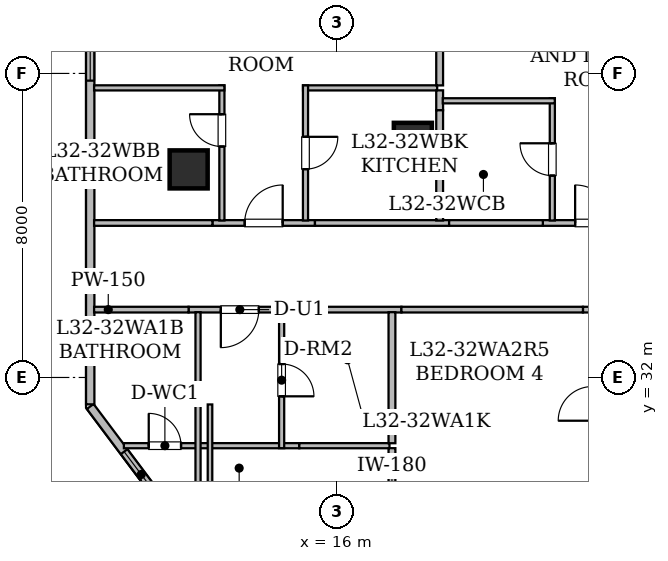
"""IFC4 building model, lengths in metres.
Left out: names, types, materials, properties, quantities, classifications, styles, units other than length and angle.
Written with IfcOpenShell. Run it as: python <this file> out.ifc"""

import sys

from ifc_helpers import new_model, si_unit, direction, frame, frame_2d, origin, origin_2d, place, context, subcontext, project, spatial, rectangle, hollow_rectangle, extrude, element, fill, save


model = new_model("IFC4")
c1 = context("Model", 3, precision=1e-05, world=origin(), true_north=direction((0.0, 1.0)))
c2 = subcontext(c1, "Body", "Model", "MODEL_VIEW")
j1 = project(units=[si_unit("LENGTHUNIT", "METRE"), si_unit("PLANEANGLEUNIT", "RADIAN")], contexts=[c1])
p1 = place(None, origin())
s1 = spatial("IfcSite", under=j1, at=p1, CompositionType="ELEMENT")
p2 = place(p1, origin())
s2 = spatial("IfcBuilding", under=s1, at=p2, CompositionType="ELEMENT")
p3 = place(p2, frame((0.0, 0.0, 127.45)))
s3 = spatial("IfcBuildingStorey", under=s2, at=p3, CompositionType="ELEMENT", Elevation=127.45)
for number, where, z_axis, x_axis in (
    (1, (12.1, 37.475, 0.0), (0.0, 0.0, 1.0), (1.0, 0.0, 0.0)),
    (2, (18.0, 38.2, 0.0), (0.0, 0.0, 1.0), (1.0, 0.0, 0.0)),
):
    element("IfcColumn", number, at=place(p3, frame(where, z_axis=z_axis, x_axis=x_axis)), inside=s3, PredefinedType="COLUMN", context=c2, shape_type="SweptSolid", body=[
        extrude(hollow_rectangle(XDim=1.0, YDim=1.0, WallThickness=0.05, at=origin_2d()), origin(), (0.0, 0.0, 1.0), 3.65),
    ])
p4 = place(p3, frame((11.881, 28.077, 0.0), z_axis=(0.0, 0.0, 1.0), x_axis=(-0.600158184825, 0.799881336942, 0.0)))
e3 = element("IfcWall", 3, at=p4, inside=s3, PredefinedType="STANDARD", context=c2, shape_type="SweptSolid", body=[
    extrude(rectangle(XDim=3.951, YDim=0.22, at=frame_2d((1.975, 0.0))), origin(), (0.0, 0.0, 1.0), 3.43),
])
p5 = place(p4, frame((0.964, 0.0, 0.85)))
e4 = element("IfcOpeningElement", 4, at=p5, cuts=e3, PredefinedType="OPENING", context=c2, shape_type="SweptSolid", body=[
    extrude(rectangle(XDim=1.5, YDim=1.6, at=frame_2d((0.75, 0.8))), frame((0.0, 0.12, 0.0), z_axis=(0.0, -1.0, 0.0), x_axis=(1.0, 0.0, 0.0)), (0.0, 0.0, 1.0), 0.24),
])
p6 = place(p3, frame((9.51, 31.293, 0.0), z_axis=(0.0, 0.0, 1.0), x_axis=(0.0, 1.0, 0.0)))
e5 = element("IfcWall", 5, at=p6, inside=s3, PredefinedType="STANDARD", context=c2, shape_type="SweptSolid", body=[
    extrude(rectangle(XDim=14.061, YDim=0.22, at=frame_2d((7.031, 0.0))), origin(), (0.0, 0.0, 1.0), 3.43),
])
p7 = place(p6, frame((8.517, 0.0, 0.8)))
e6 = element("IfcOpeningElement", 6, at=p7, cuts=e5, PredefinedType="OPENING", context=c2, shape_type="SweptSolid", body=[
    extrude(rectangle(XDim=1.2, YDim=1.5, at=frame_2d((0.6, 0.75))), frame((0.0, 0.12, 0.0), z_axis=(0.0, -1.0, 0.0), x_axis=(1.0, 0.0, 0.0)), (0.0, 0.0, 1.0), 0.24),
])
p8 = place(p6, frame((10.766, 0.0, 0.85)))
e7 = element("IfcOpeningElement", 7, at=p8, cuts=e5, PredefinedType="OPENING", context=c2, shape_type="SweptSolid", body=[
    extrude(rectangle(XDim=1.65, YDim=1.55, at=frame_2d((0.825, 0.775))), frame((0.0, 0.12, 0.0), z_axis=(0.0, -1.0, 0.0), x_axis=(1.0, 0.0, 0.0)), (0.0, 0.0, 1.0), 0.24),
])
p9 = place(p3, frame((14.796, 33.785, 0.0), z_axis=(0.0, 0.0, 1.0), x_axis=(-1.0, 0.0, 0.0)))
e8 = element("IfcWall", 8, at=p9, inside=s3, PredefinedType="STANDARD", context=c2, shape_type="SweptSolid", body=[
    extrude(rectangle(XDim=2.698, YDim=0.15, at=frame_2d((1.349, 0.0))), origin(), (0.0, 0.0, 1.0), 2.876),
])
p10 = place(p9, frame((0.849, 0.0, 0.0)))
e9 = element("IfcOpeningElement", 9, at=p10, cuts=e8, PredefinedType="OPENING", context=c2, shape_type="SweptSolid", body=[
    extrude(rectangle(XDim=1.0, YDim=2.15, at=frame_2d((0.5, 1.075))), frame((0.0, 0.085, 0.0), z_axis=(0.0, -1.0, 0.0), x_axis=(1.0, 0.0, 0.0)), (0.0, 0.0, 1.0), 0.17),
])
p11 = place(p3, frame((12.098, 33.785, 0.0), z_axis=(0.0, 0.0, 1.0), x_axis=(-1.0, 0.0, 0.0)))
e10 = element("IfcWall", 10, at=p11, inside=s3, PredefinedType="STANDARD", context=c2, shape_type="SweptSolid", body=[
    extrude(rectangle(XDim=2.486, YDim=0.15, at=frame_2d((1.243, 0.0))), origin(), (0.0, 0.0, 1.0), 2.876),
])
p12 = place(p3, frame((17.699, 33.785, 0.0), z_axis=(0.0, 0.0, 1.0), x_axis=(-1.0, 0.0, 0.0)))
e11 = element("IfcWall", 11, at=p12, inside=s3, PredefinedType="STANDARD", context=c2, shape_type="SweptSolid", body=[
    extrude(rectangle(XDim=2.903, YDim=0.15, at=frame_2d((1.452, 0.0))), origin(), (0.0, 0.0, 1.0), 3.43),
])
p13 = place(p3, frame((24.056, 33.785, 0.0), z_axis=(0.0, 0.0, 1.0), x_axis=(-1.0, 0.0, 0.0)))
e12 = element("IfcWall", 12, at=p13, inside=s3, PredefinedType="STANDARD", context=c2, shape_type="SweptSolid", body=[
    extrude(rectangle(XDim=1.58, YDim=0.15, at=frame_2d((0.79, 0.0))), origin(), (0.0, 0.0, 1.0), 3.43),
])
p14 = place(p3, frame((22.476, 33.785, 0.0), z_axis=(0.0, 0.0, 1.0), x_axis=(-1.0, 0.0, 0.0)))
e13 = element("IfcWall", 13, at=p14, inside=s3, PredefinedType="STANDARD", context=c2, shape_type="SweptSolid", body=[
    extrude(rectangle(XDim=4.777, YDim=0.15, at=frame_2d((2.389, 0.0))), origin(), (0.0, 0.0, 1.0), 2.647),
])
p15 = place(p3, frame((12.726, 36.065, 0.0), z_axis=(0.0, 0.0, 1.0), x_axis=(1.0, 0.0, 0.0)))
e14 = element("IfcWall", 14, at=p15, inside=s3, PredefinedType="STANDARD", context=c2, shape_type="SweptSolid", body=[
    extrude(rectangle(XDim=2.698, YDim=0.15, at=frame_2d((1.349, 0.0))), origin(), (0.0, 0.0, 1.0), 3.43),
])
p16 = place(p15, frame((0.849, 0.0, 0.0)))
e15 = element("IfcOpeningElement", 15, at=p16, cuts=e14, PredefinedType="OPENING", context=c2, shape_type="SweptSolid", body=[
    extrude(rectangle(XDim=1.0, YDim=2.15, at=frame_2d((0.5, 1.075))), frame((0.0, 0.085, 0.0), z_axis=(0.0, -1.0, 0.0), x_axis=(1.0, 0.0, 0.0)), (0.0, 0.0, 1.0), 0.17),
])
p17 = place(p3, frame((9.612, 36.065, 0.0), z_axis=(0.0, 0.0, 1.0), x_axis=(1.0, 0.0, 0.0)))
e16 = element("IfcWall", 16, at=p17, inside=s3, PredefinedType="STANDARD", context=c2, shape_type="SweptSolid", body=[
    extrude(rectangle(XDim=3.114, YDim=0.15, at=frame_2d((1.557, 0.0))), origin(), (0.0, 0.0, 1.0), 2.876),
])
p18 = place(p3, frame((15.424, 36.065, 0.0), z_axis=(0.0, 0.0, 1.0), x_axis=(1.0, 0.0, 0.0)))
e17 = element("IfcWall", 17, at=p18, inside=s3, PredefinedType="STANDARD", context=c2, shape_type="SweptSolid", body=[
    extrude(rectangle(XDim=3.53, YDim=0.15, at=frame_2d((1.765, 0.0))), origin(), (0.0, 0.0, 1.0), 2.647),
])
p19 = place(p3, frame((21.421, 36.065, 0.0), z_axis=(0.0, 0.0, 1.0), x_axis=(1.0, 0.0, 0.0)))
e18 = element("IfcWall", 18, at=p19, inside=s3, PredefinedType="STANDARD", context=c2, shape_type="SweptSolid", body=[
    extrude(rectangle(XDim=2.698, YDim=0.15, at=frame_2d((1.349, 0.0))), origin(), (0.0, 0.0, 1.0), 3.43),
])
p20 = place(p19, frame((0.849, 0.0, 0.0)))
e19 = element("IfcOpeningElement", 19, at=p20, cuts=e18, PredefinedType="OPENING", context=c2, shape_type="SweptSolid", body=[
    extrude(rectangle(XDim=1.0, YDim=2.15, at=frame_2d((0.5, 1.075))), frame((0.0, 0.085, 0.0), z_axis=(0.0, -1.0, 0.0), x_axis=(1.0, 0.0, 0.0)), (0.0, 0.0, 1.0), 0.17),
])
p21 = place(p3, frame((18.954, 36.065, 0.0), z_axis=(0.0, 0.0, 1.0), x_axis=(1.0, 0.0, 0.0)))
e20 = element("IfcWall", 20, at=p21, inside=s3, PredefinedType="STANDARD", context=c2, shape_type="SweptSolid", body=[
    extrude(rectangle(XDim=2.467, YDim=0.15, at=frame_2d((1.233, 0.0))), origin(), (0.0, 0.0, 1.0), 3.43),
])
p22 = place(p3, frame((10.396, 30.205, 0.0), z_axis=(0.0, 0.0, 1.0), x_axis=(1.0, 0.0, 0.0)))
e21 = element("IfcWall", 21, at=p22, inside=s3, PredefinedType="PARTITIONING", context=c2, shape_type="SweptSolid", body=[
    extrude(rectangle(XDim=4.616, YDim=0.135, at=frame_2d((2.308, 0.0))), origin(), (0.0, 0.0, 1.0), 2.876),
])
p23 = place(p22, frame((0.654, 0.0, 0.0)))
e22 = element("IfcOpeningElement", 22, at=p23, cuts=e21, PredefinedType="OPENING", context=c2, shape_type="SweptSolid", body=[
    extrude(rectangle(XDim=0.85, YDim=2.1, at=frame_2d((0.425, 1.05))), frame((0.0, 0.077, 0.0), z_axis=(0.0, -1.0, 0.0), x_axis=(1.0, 0.0, 0.0)), (0.0, 0.0, 1.0), 0.155),
])
p24 = place(p3, frame((12.347, 27.54, 0.0), z_axis=(0.0, 0.0, 1.0), x_axis=(0.0, 1.0, 0.0)))
e23 = element("IfcWall", 23, at=p24, inside=s3, PredefinedType="PARTITIONING", context=c2, shape_type="SweptSolid", body=[
    extrude(rectangle(XDim=6.178, YDim=0.135, at=frame_2d((3.089, 0.0))), origin(), (0.0, 0.0, 1.0), 2.876),
])
p25 = place(p3, frame((14.547, 33.718, 0.0), z_axis=(0.0, 0.0, 1.0), x_axis=(0.0, -1.0, 0.0)))
e24 = element("IfcWall", 24, at=p25, inside=s3, PredefinedType="PARTITIONING", context=c2, shape_type="SweptSolid", body=[
    extrude(rectangle(XDim=3.578, YDim=0.135, at=frame_2d((1.789, 0.0))), origin(), (0.0, 0.0, 1.0), 3.43),
])
p26 = place(p25, frame((1.364, 0.0, 0.0)))
e25 = element("IfcOpeningElement", 25, at=p26, cuts=e24, PredefinedType="OPENING", context=c2, shape_type="SweptSolid", body=[
    extrude(rectangle(XDim=0.85, YDim=2.1, at=frame_2d((0.425, 1.05))), frame((0.0, 0.077, 0.0), z_axis=(0.0, -1.0, 0.0), x_axis=(1.0, 0.0, 0.0)), (0.0, 0.0, 1.0), 0.155),
])
p27 = place(p3, frame((15.012, 30.205, 0.0), z_axis=(0.0, 0.0, 1.0), x_axis=(1.0, 0.0, 0.0)))
e26 = element("IfcWall", 26, at=p27, inside=s3, PredefinedType="PARTITIONING", context=c2, shape_type="SweptSolid", body=[
    extrude(rectangle(XDim=2.373, YDim=0.135, at=frame_2d((1.187, 0.0))), origin(), (0.0, 0.0, 1.0), 3.43),
])
p28 = place(p3, frame((12.662, 17.268, 0.0), z_axis=(0.0, 0.0, 1.0), x_axis=(0.0, 1.0, 0.0)))
e27 = element("IfcWall", 27, at=p28, inside=s3, PredefinedType="PARTITIONING", context=c2, shape_type="SweptSolid", body=[
    extrude(rectangle(XDim=14.022, YDim=0.12, at=frame_2d((7.011, 0.0))), origin(), (0.0, 0.0, 1.0), 2.647),
])
p29 = place(p28, frame((5.332, 0.0, 0.0)))
e28 = element("IfcOpeningElement", 28, at=p29, cuts=e27, PredefinedType="OPENING", context=c2, shape_type="SweptSolid", body=[
    extrude(rectangle(XDim=0.9, YDim=2.1, at=frame_2d((0.45, 1.05))), frame((0.0, 0.07, 0.0), z_axis=(0.0, -1.0, 0.0), x_axis=(1.0, 0.0, 0.0)), (0.0, 0.0, 1.0), 0.14),
])
p30 = place(p3, frame((17.45, 30.14, 0.0), z_axis=(0.0, 0.0, 1.0), x_axis=(0.0, -1.0, 0.0)))
e29 = element("IfcWall", 29, at=p30, inside=s3, PredefinedType="STANDARD", context=c2, shape_type="SweptSolid", body=[
    extrude(rectangle(XDim=1.45, YDim=0.18, at=frame_2d((0.725, 0.0))), origin(), (0.0, 0.0, 1.0), 3.43),
])
p31 = place(p3, frame((17.45, 33.718, 0.0), z_axis=(0.0, 0.0, 1.0), x_axis=(0.0, -1.0, 0.0)))
e30 = element("IfcWall", 30, at=p31, inside=s3, PredefinedType="STANDARD", context=c2, shape_type="SweptSolid", body=[
    extrude(rectangle(XDim=3.448, YDim=0.18, at=frame_2d((1.724, 0.0))), origin(), (0.0, 0.0, 1.0), 3.43),
])
p32 = place(p3, frame((12.975, 36.13, 0.0), z_axis=(0.0, 0.0, 1.0), x_axis=(0.0, 1.0, 0.0)))
e31 = element("IfcWall", 31, at=p32, inside=s3, PredefinedType="PARTITIONING", context=c2, shape_type="SweptSolid", body=[
    extrude(rectangle(XDim=3.555, YDim=0.135, at=frame_2d((1.778, 0.0))), origin(), (0.0, 0.0, 1.0), 2.647),
])
p33 = place(p32, frame((1.947, 0.0, 0.0)))
e32 = element("IfcOpeningElement", 32, at=p33, cuts=e31, PredefinedType="OPENING", context=c2, shape_type="SweptSolid", body=[
    extrude(rectangle(XDim=0.85, YDim=2.1, at=frame_2d((0.425, 1.05))), frame((0.0, 0.077, 0.0), z_axis=(0.0, -1.0, 0.0), x_axis=(1.0, 0.0, 0.0)), (0.0, 0.0, 1.0), 0.155),
])
p34 = place(p3, frame((13.04, 39.62, 0.0), z_axis=(0.0, 0.0, 1.0), x_axis=(-1.0, 0.0, 0.0)))
e33 = element("IfcWall", 33, at=p34, inside=s3, PredefinedType="PARTITIONING", context=c2, shape_type="SweptSolid", body=[
    extrude(rectangle(XDim=3.428, YDim=0.135, at=frame_2d((1.714, 0.0))), origin(), (0.0, 0.0, 1.0), 2.876),
])
p35 = place(p3, frame((18.64, 39.62, 0.0), z_axis=(0.0, 0.0, 1.0), x_axis=(-1.0, 0.0, 0.0)))
e34 = element("IfcWall", 34, at=p35, inside=s3, PredefinedType="PARTITIONING", context=c2, shape_type="SweptSolid", body=[
    extrude(rectangle(XDim=3.53, YDim=0.135, at=frame_2d((1.765, 0.0))), origin(), (0.0, 0.0, 1.0), 2.647),
])
p36 = place(p3, frame((15.175, 39.685, 0.0), z_axis=(0.0, 0.0, 1.0), x_axis=(0.0, -1.0, 0.0)))
e35 = element("IfcWall", 35, at=p36, inside=s3, PredefinedType="PARTITIONING", context=c2, shape_type="SweptSolid", body=[
    extrude(rectangle(XDim=3.555, YDim=0.135, at=frame_2d((1.778, 0.0))), origin(), (0.0, 0.0, 1.0), 2.647),
])
p37 = place(p36, frame((1.353, 0.0, 0.0)))
e36 = element("IfcOpeningElement", 36, at=p37, cuts=e35, PredefinedType="OPENING", context=c2, shape_type="SweptSolid", body=[
    extrude(rectangle(XDim=0.85, YDim=2.1, at=frame_2d((0.425, 1.05))), frame((0.0, 0.077, 0.0), z_axis=(0.0, -1.0, 0.0), x_axis=(1.0, 0.0, 0.0)), (0.0, 0.0, 1.0), 0.155),
])
p38 = place(p3, frame((18.705, 41.109, 0.0), z_axis=(0.0, 0.0, 1.0), x_axis=(0.0, -1.0, 0.0)))
e37 = element("IfcWall", 37, at=p38, inside=s3, PredefinedType="STANDARD", context=c2, shape_type="SweptSolid", body=[
    extrude(rectangle(XDim=1.424, YDim=0.18, at=frame_2d((0.712, 0.0))), origin(), (0.0, 0.0, 1.0), 3.43),
])
p39 = place(p3, frame((18.705, 39.555, 0.0), z_axis=(0.0, 0.0, 1.0), x_axis=(0.0, -1.0, 0.0)))
e38 = element("IfcWall", 38, at=p39, inside=s3, PredefinedType="STANDARD", context=c2, shape_type="SweptSolid", body=[
    extrude(rectangle(XDim=0.524, YDim=0.18, at=frame_2d((0.262, 0.0))), origin(), (0.0, 0.0, 1.0), 3.43),
])
p40 = place(p3, frame((18.705, 39.031, 0.0), z_axis=(0.0, 0.0, 1.0), x_axis=(0.0, -1.0, 0.0)))
e39 = element("IfcWall", 39, at=p40, inside=s3, PredefinedType="STANDARD", context=c2, shape_type="SweptSolid", body=[
    extrude(rectangle(XDim=2.901, YDim=0.18, at=frame_2d((1.451, 0.0))), origin(), (0.0, 0.0, 1.0), 2.647),
])
p41 = place(p3, frame((21.67, 36.13, 0.0), z_axis=(0.0, 0.0, 1.0), x_axis=(0.0, 1.0, 0.0)))
e40 = element("IfcWall", 40, at=p41, inside=s3, PredefinedType="PARTITIONING", context=c2, shape_type="SweptSolid", body=[
    extrude(rectangle(XDim=3.215, YDim=0.135, at=frame_2d((1.607, 0.0))), origin(), (0.0, 0.0, 1.0), 2.647),
])
p42 = place(p41, frame((1.182, 0.0, 0.0)))
e41 = element("IfcOpeningElement", 41, at=p42, cuts=e40, PredefinedType="OPENING", context=c2, shape_type="SweptSolid", body=[
    extrude(rectangle(XDim=0.85, YDim=2.1, at=frame_2d((0.425, 1.05))), frame((0.0, 0.077, 0.0), z_axis=(0.0, -1.0, 0.0), x_axis=(1.0, 0.0, 0.0)), (0.0, 0.0, 1.0), 0.155),
])
p43 = place(p3, frame((21.735, 39.28, 0.0), z_axis=(0.0, 0.0, 1.0), x_axis=(-1.0, 0.0, 0.0)))
e42 = element("IfcWall", 42, at=p43, inside=s3, PredefinedType="PARTITIONING", context=c2, shape_type="SweptSolid", body=[
    extrude(rectangle(XDim=2.948, YDim=0.135, at=frame_2d((1.474, 0.0))), origin(), (0.0, 0.0, 1.0), 3.43),
])
p44 = place(p5, origin())
e43 = element("IfcWindow", 43, at=p44, inside=s3, PartitioningType="SINGLE_PANEL", PredefinedType="WINDOW", context=c2, shape_type="SweptSolid", body=[
    extrude(rectangle(XDim=1.5, YDim=1.6, at=frame_2d((0.75, 0.8))), frame((0.0, 0.03, 0.0), z_axis=(0.0, -1.0, 0.0), x_axis=(1.0, 0.0, 0.0)), (0.0, 0.0, 1.0), 0.06),
])
fill(e4, e43)
p45 = place(p7, origin())
e44 = element("IfcWindow", 44, at=p45, inside=s3, PartitioningType="SINGLE_PANEL", PredefinedType="WINDOW", context=c2, shape_type="SweptSolid", body=[
    extrude(rectangle(XDim=1.2, YDim=1.5, at=frame_2d((0.6, 0.75))), frame((0.0, 0.03, 0.0), z_axis=(0.0, -1.0, 0.0), x_axis=(1.0, 0.0, 0.0)), (0.0, 0.0, 1.0), 0.06),
])
fill(e6, e44)
p46 = place(p10, origin())
e45 = element("IfcDoor", 45, at=p46, inside=s3, OperationType="SINGLE_SWING_RIGHT", PredefinedType="DOOR", context=c2, shape_type="SweptSolid", body=[
    extrude(rectangle(XDim=1.0, YDim=2.15, at=frame_2d((0.5, 1.075))), frame((0.0, 0.025, 0.0), z_axis=(0.0, -1.0, 0.0), x_axis=(1.0, 0.0, 0.0)), (0.0, 0.0, 1.0), 0.05),
])
fill(e9, e45)
p47 = place(p16, origin())
e46 = element("IfcDoor", 46, at=p47, inside=s3, OperationType="SINGLE_SWING_RIGHT", PredefinedType="DOOR", context=c2, shape_type="SweptSolid", body=[
    extrude(rectangle(XDim=1.0, YDim=2.15, at=frame_2d((0.5, 1.075))), frame((0.0, 0.025, 0.0), z_axis=(0.0, -1.0, 0.0), x_axis=(1.0, 0.0, 0.0)), (0.0, 0.0, 1.0), 0.05),
])
fill(e15, e46)
p48 = place(p20, origin())
e47 = element("IfcDoor", 47, at=p48, inside=s3, OperationType="SINGLE_SWING_LEFT", PredefinedType="DOOR", context=c2, shape_type="SweptSolid", body=[
    extrude(rectangle(XDim=1.0, YDim=2.15, at=frame_2d((0.5, 1.075))), frame((0.0, 0.025, 0.0), z_axis=(0.0, -1.0, 0.0), x_axis=(1.0, 0.0, 0.0)), (0.0, 0.0, 1.0), 0.05),
])
fill(e19, e47)
p49 = place(p23, origin())
e48 = element("IfcDoor", 48, at=p49, inside=s3, OperationType="SINGLE_SWING_LEFT", PredefinedType="DOOR", context=c2, shape_type="SweptSolid", body=[
    extrude(rectangle(XDim=0.85, YDim=2.1, at=frame_2d((0.425, 1.05))), frame((0.0, 0.025, 0.0), z_axis=(0.0, -1.0, 0.0), x_axis=(1.0, 0.0, 0.0)), (0.0, 0.0, 1.0), 0.05),
])
fill(e22, e48)
p50 = place(p26, origin())
e49 = element("IfcDoor", 49, at=p50, inside=s3, OperationType="SINGLE_SWING_RIGHT", PredefinedType="DOOR", context=c2, shape_type="SweptSolid", body=[
    extrude(rectangle(XDim=0.85, YDim=2.1, at=frame_2d((0.425, 1.05))), frame((0.0, 0.025, 0.0), z_axis=(0.0, -1.0, 0.0), x_axis=(1.0, 0.0, 0.0)), (0.0, 0.0, 1.0), 0.05),
])
fill(e25, e49)
p51 = place(p33, origin())
e50 = element("IfcDoor", 50, at=p51, inside=s3, OperationType="SINGLE_SWING_RIGHT", PredefinedType="DOOR", context=c2, shape_type="SweptSolid", body=[
    extrude(rectangle(XDim=0.85, YDim=2.1, at=frame_2d((0.425, 1.05))), frame((0.0, 0.025, 0.0), z_axis=(0.0, -1.0, 0.0), x_axis=(1.0, 0.0, 0.0)), (0.0, 0.0, 1.0), 0.05),
])
fill(e32, e50)
p52 = place(p37, origin())
e51 = element("IfcDoor", 51, at=p52, inside=s3, OperationType="SINGLE_SWING_LEFT", PredefinedType="DOOR", context=c2, shape_type="SweptSolid", body=[
    extrude(rectangle(XDim=0.85, YDim=2.1, at=frame_2d((0.425, 1.05))), frame((0.0, 0.025, 0.0), z_axis=(0.0, -1.0, 0.0), x_axis=(1.0, 0.0, 0.0)), (0.0, 0.0, 1.0), 0.05),
])
fill(e36, e51)
p53 = place(p42, origin())
e52 = element("IfcDoor", 52, at=p53, inside=s3, OperationType="SINGLE_SWING_RIGHT", PredefinedType="DOOR", context=c2, shape_type="SweptSolid", body=[
    extrude(rectangle(XDim=0.85, YDim=2.1, at=frame_2d((0.425, 1.05))), frame((0.0, 0.025, 0.0), z_axis=(0.0, -1.0, 0.0), x_axis=(1.0, 0.0, 0.0)), (0.0, 0.0, 1.0), 0.05),
])
fill(e41, e52)
save(model, sys.argv[1])
